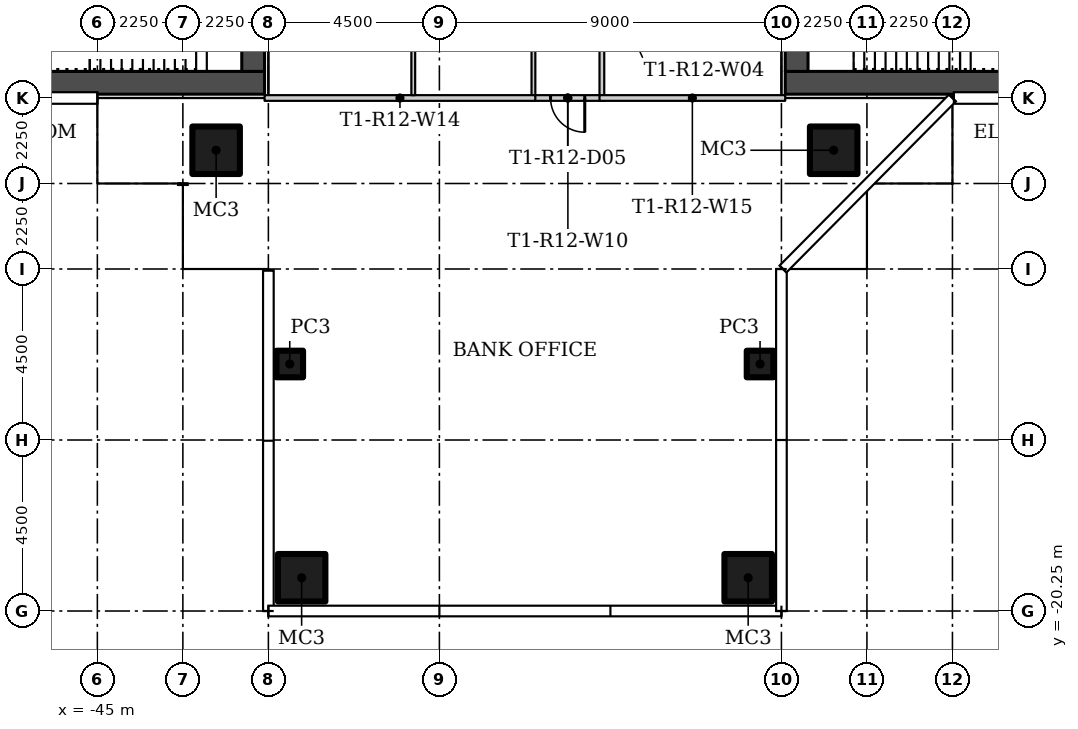
"""IFC4 building model, lengths in metres.
Left out: names, types, materials, properties, quantities, classifications, styles, units other than length and angle.
Written with IfcOpenShell. Run it as: python <this file> out.ifc"""

import sys

from ifc_helpers import new_model, si_unit, direction, frame, frame_2d, origin, origin_2d, place, context, subcontext, project, spatial, rectangle, hollow_rectangle, extrude, element, fill, save


model = new_model("IFC4")
c1 = context("Model", 3, precision=1e-05, world=origin(), true_north=direction((0.0, 1.0)))
c2 = subcontext(c1, "Body", "Model", "MODEL_VIEW")
j1 = project(units=[si_unit("LENGTHUNIT", "METRE"), si_unit("PLANEANGLEUNIT", "RADIAN")], contexts=[c1])
p1 = place(None, origin())
s1 = spatial("IfcSite", under=j1, at=p1, CompositionType="ELEMENT")
p2 = place(p1, origin())
s2 = spatial("IfcBuilding", under=s1, at=p2, CompositionType="ELEMENT")
p3 = place(p2, frame((0.0, 0.0, 113.1)))
s3 = spatial("IfcBuildingStorey", under=s2, at=p3, CompositionType="ELEMENT", Elevation=113.1)
for number, where in (
    (1, (-25.625, -8.125, 0.0)),
    (2, (-41.875, -8.125, 0.0)),
):
    element("IfcColumn", number, at=place(p3, frame(where)), inside=s3, PredefinedType="COLUMN", context=c2, shape_type="SweptSolid", body=[
        extrude(hollow_rectangle(XDim=1.25, YDim=1.25, WallThickness=0.05, at=origin_2d()), origin(), (0.0, 0.0, 1.0), 3.55),
    ])
p4 = place(p3, frame((-39.938, -13.75, 0.0)))
e3 = element("IfcColumn", 3, at=p4, inside=s3, PredefinedType="COLUMN", context=c2, shape_type="SweptSolid", body=[
    extrude(hollow_rectangle(XDim=0.7, YDim=0.7, WallThickness=0.025, at=origin_2d()), origin(), (0.0, 0.0, 1.0), 3.55),
])
p5 = place(p3, frame((-39.625, -19.375, 0.0)))
e4 = element("IfcColumn", 4, at=p5, inside=s3, PredefinedType="COLUMN", context=c2, shape_type="SweptSolid", body=[
    extrude(hollow_rectangle(XDim=1.25, YDim=1.25, WallThickness=0.05, at=origin_2d()), origin(), (0.0, 0.0, 1.0), 3.55),
])
p6 = place(p3, frame((-27.562, -13.75, 0.0)))
e5 = element("IfcColumn", 5, at=p6, inside=s3, PredefinedType="COLUMN", context=c2, shape_type="SweptSolid", body=[
    extrude(hollow_rectangle(XDim=0.7, YDim=0.7, WallThickness=0.025, at=origin_2d()), origin(), (0.0, 0.0, 1.0), 3.55),
])
p7 = place(p3, frame((-27.875, -19.375, 0.0)))
e6 = element("IfcColumn", 6, at=p7, inside=s3, PredefinedType="COLUMN", context=c2, shape_type="SweptSolid", body=[
    extrude(hollow_rectangle(XDim=1.25, YDim=1.25, WallThickness=0.05, at=origin_2d()), origin(), (0.0, 0.0, 1.0), 3.55),
])
p8 = place(p3, frame((-31.725, -0.013, 0.0), z_axis=(0.0, 0.0, 1.0), x_axis=(0.0, -1.0, 0.0)))
e7 = element("IfcWall", 7, at=p8, inside=s3, PredefinedType="PARTITIONING", context=c2, shape_type="SweptSolid", body=[
    extrude(rectangle(XDim=6.662, YDim=0.125, at=frame_2d((3.331, 0.0))), origin(), (0.0, 0.0, 1.0), 3.55),
])
p9 = place(p3, frame((-33.525, -6.675, 0.0), z_axis=(0.0, 0.0, 1.0), x_axis=(0.0, 1.0, 0.0)))
e8 = element("IfcWall", 8, at=p9, inside=s3, PredefinedType="PARTITIONING", context=c2, shape_type="SweptSolid", body=[
    extrude(rectangle(XDim=6.675, YDim=0.1, at=frame_2d((3.337, 0.0))), origin(), (0.0, 0.0, 1.0), 3.55),
])
p10 = place(p9, frame((2.875, 0.0, 0.0)))
e9 = element("IfcOpeningElement", 9, at=p10, cuts=e8, PredefinedType="OPENING", context=c2, shape_type="SweptSolid", body=[
    extrude(rectangle(XDim=0.9, YDim=2.1, at=frame_2d((0.45, 1.05))), frame((0.0, 0.06, 0.0), z_axis=(0.0, -1.0, 0.0), x_axis=(1.0, 0.0, 0.0)), (0.0, 0.0, 1.0), 0.12),
])
p11 = place(p3, frame((-31.662, -6.75, 0.0), z_axis=(0.0, 0.0, 1.0), x_axis=(-1.0, 0.0, 0.0)))
e10 = element("IfcWall", 10, at=p11, inside=s3, PredefinedType="PARTITIONING", context=c2, shape_type="SweptSolid", body=[
    extrude(rectangle(XDim=1.913, YDim=0.15, at=frame_2d((0.957, 0.0))), origin(), (0.0, 0.0, 1.0), 3.55),
])
p12 = place(p11, frame((0.513, 0.0, 0.0)))
e11 = element("IfcOpeningElement", 11, at=p12, cuts=e10, PredefinedType="OPENING", context=c2, shape_type="SweptSolid", body=[
    extrude(rectangle(XDim=0.9, YDim=2.1, at=frame_2d((0.45, 1.05))), frame((0.0, 0.085, 0.0), z_axis=(0.0, -1.0, 0.0), x_axis=(1.0, 0.0, 0.0)), (0.0, 0.0, 1.0), 0.17),
])
p13 = place(p3, frame((-40.6, -6.75, 0.0)))
e12 = element("IfcWall", 12, at=p13, inside=s3, PredefinedType="PARTITIONING", context=c2, shape_type="SweptSolid", body=[
    extrude(rectangle(XDim=7.125, YDim=0.15, at=frame_2d((3.562, 0.0))), origin(), (0.0, 0.0, 1.0), 3.55),
])
p14 = place(p3, frame((-31.787, -6.75, 0.0)))
e13 = element("IfcWall", 13, at=p14, inside=s3, PredefinedType="PARTITIONING", context=c2, shape_type="SweptSolid", body=[
    extrude(rectangle(XDim=4.887, YDim=0.15, at=frame_2d((2.444, 0.0))), origin(), (0.0, 0.0, 1.0), 3.55),
])
p15 = place(p3, frame((-36.688, -6.675, 0.0), z_axis=(0.0, 0.0, 1.0), x_axis=(0.0, 1.0, 0.0)))
e14 = element("IfcWall", 14, at=p15, inside=s3, PredefinedType="PARTITIONING", context=c2, shape_type="SweptSolid", body=[
    extrude(rectangle(XDim=6.675, YDim=0.1, at=frame_2d((3.337, 0.0))), origin(), (0.0, 0.0, 1.0), 3.55),
])
p16 = place(p3, frame((-26.9, -6.35, 0.0)))
e15 = element("IfcWall", 15, at=p16, inside=s3, PredefinedType="SHEAR", context=c2, shape_type="SweptSolid", body=[
    extrude(rectangle(XDim=13.3, YDim=0.6, at=frame_2d((6.65, 0.0))), origin(), (0.0, 0.0, 1.0), 3.55),
])
p17 = place(p3, frame((-26.6, 6.05, 0.0), z_axis=(0.0, 0.0, 1.0), x_axis=(0.0, -1.0, 0.0)))
e16 = element("IfcWall", 16, at=p17, inside=s3, PredefinedType="SHEAR", context=c2, shape_type="SweptSolid", body=[
    extrude(rectangle(XDim=12.1, YDim=0.6, at=frame_2d((6.05, 0.0))), origin(), (0.0, 0.0, 1.0), 3.55),
])
p18 = place(p17, frame((3.9, 0.0, 0.0)))
e17 = element("IfcOpeningElement", 17, at=p18, cuts=e16, PredefinedType="OPENING", context=c2, shape_type="SweptSolid", body=[
    extrude(rectangle(XDim=1.8, YDim=2.4, at=frame_2d((0.9, 1.2))), frame((0.0, 0.31, 0.0), z_axis=(0.0, -1.0, 0.0), x_axis=(1.0, 0.0, 0.0)), (0.0, 0.0, 1.0), 0.62),
])
p19 = place(p3, frame((-40.6, -6.35, 0.0), z_axis=(0.0, 0.0, 1.0), x_axis=(-1.0, 0.0, 0.0)))
e18 = element("IfcWall", 18, at=p19, inside=s3, PredefinedType="SHEAR", context=c2, shape_type="SweptSolid", body=[
    extrude(rectangle(XDim=13.3, YDim=0.6, at=frame_2d((6.65, 0.0))), origin(), (0.0, 0.0, 1.0), 3.55),
])
p20 = place(p3, frame((-40.9, -6.05, 0.0), z_axis=(0.0, 0.0, 1.0), x_axis=(0.0, 1.0, 0.0)))
e19 = element("IfcWall", 19, at=p20, inside=s3, PredefinedType="SHEAR", context=c2, shape_type="SweptSolid", body=[
    extrude(rectangle(XDim=12.1, YDim=0.6, at=frame_2d((6.05, 0.0))), origin(), (0.0, 0.0, 1.0), 3.55),
])
p21 = place(p20, frame((6.4, 0.0, 0.0)))
e20 = element("IfcOpeningElement", 20, at=p21, cuts=e19, PredefinedType="OPENING", context=c2, shape_type="SweptSolid", body=[
    extrude(rectangle(XDim=1.8, YDim=2.4, at=frame_2d((0.9, 1.2))), frame((0.0, 0.31, 0.0), z_axis=(0.0, -1.0, 0.0), x_axis=(1.0, 0.0, 0.0)), (0.0, 0.0, 1.0), 0.62),
])
p22 = place(p12, origin())
e21 = element("IfcDoor", 21, at=p22, inside=s3, OperationType="SINGLE_SWING_RIGHT", PredefinedType="DOOR", context=c2, shape_type="SweptSolid", body=[
    extrude(rectangle(XDim=0.9, YDim=2.1, at=frame_2d((0.45, 1.05))), frame((0.0, 0.025, 0.0), z_axis=(0.0, -1.0, 0.0), x_axis=(1.0, 0.0, 0.0)), (0.0, 0.0, 1.0), 0.05),
])
fill(e11, e21)
save(model, sys.argv[1])
